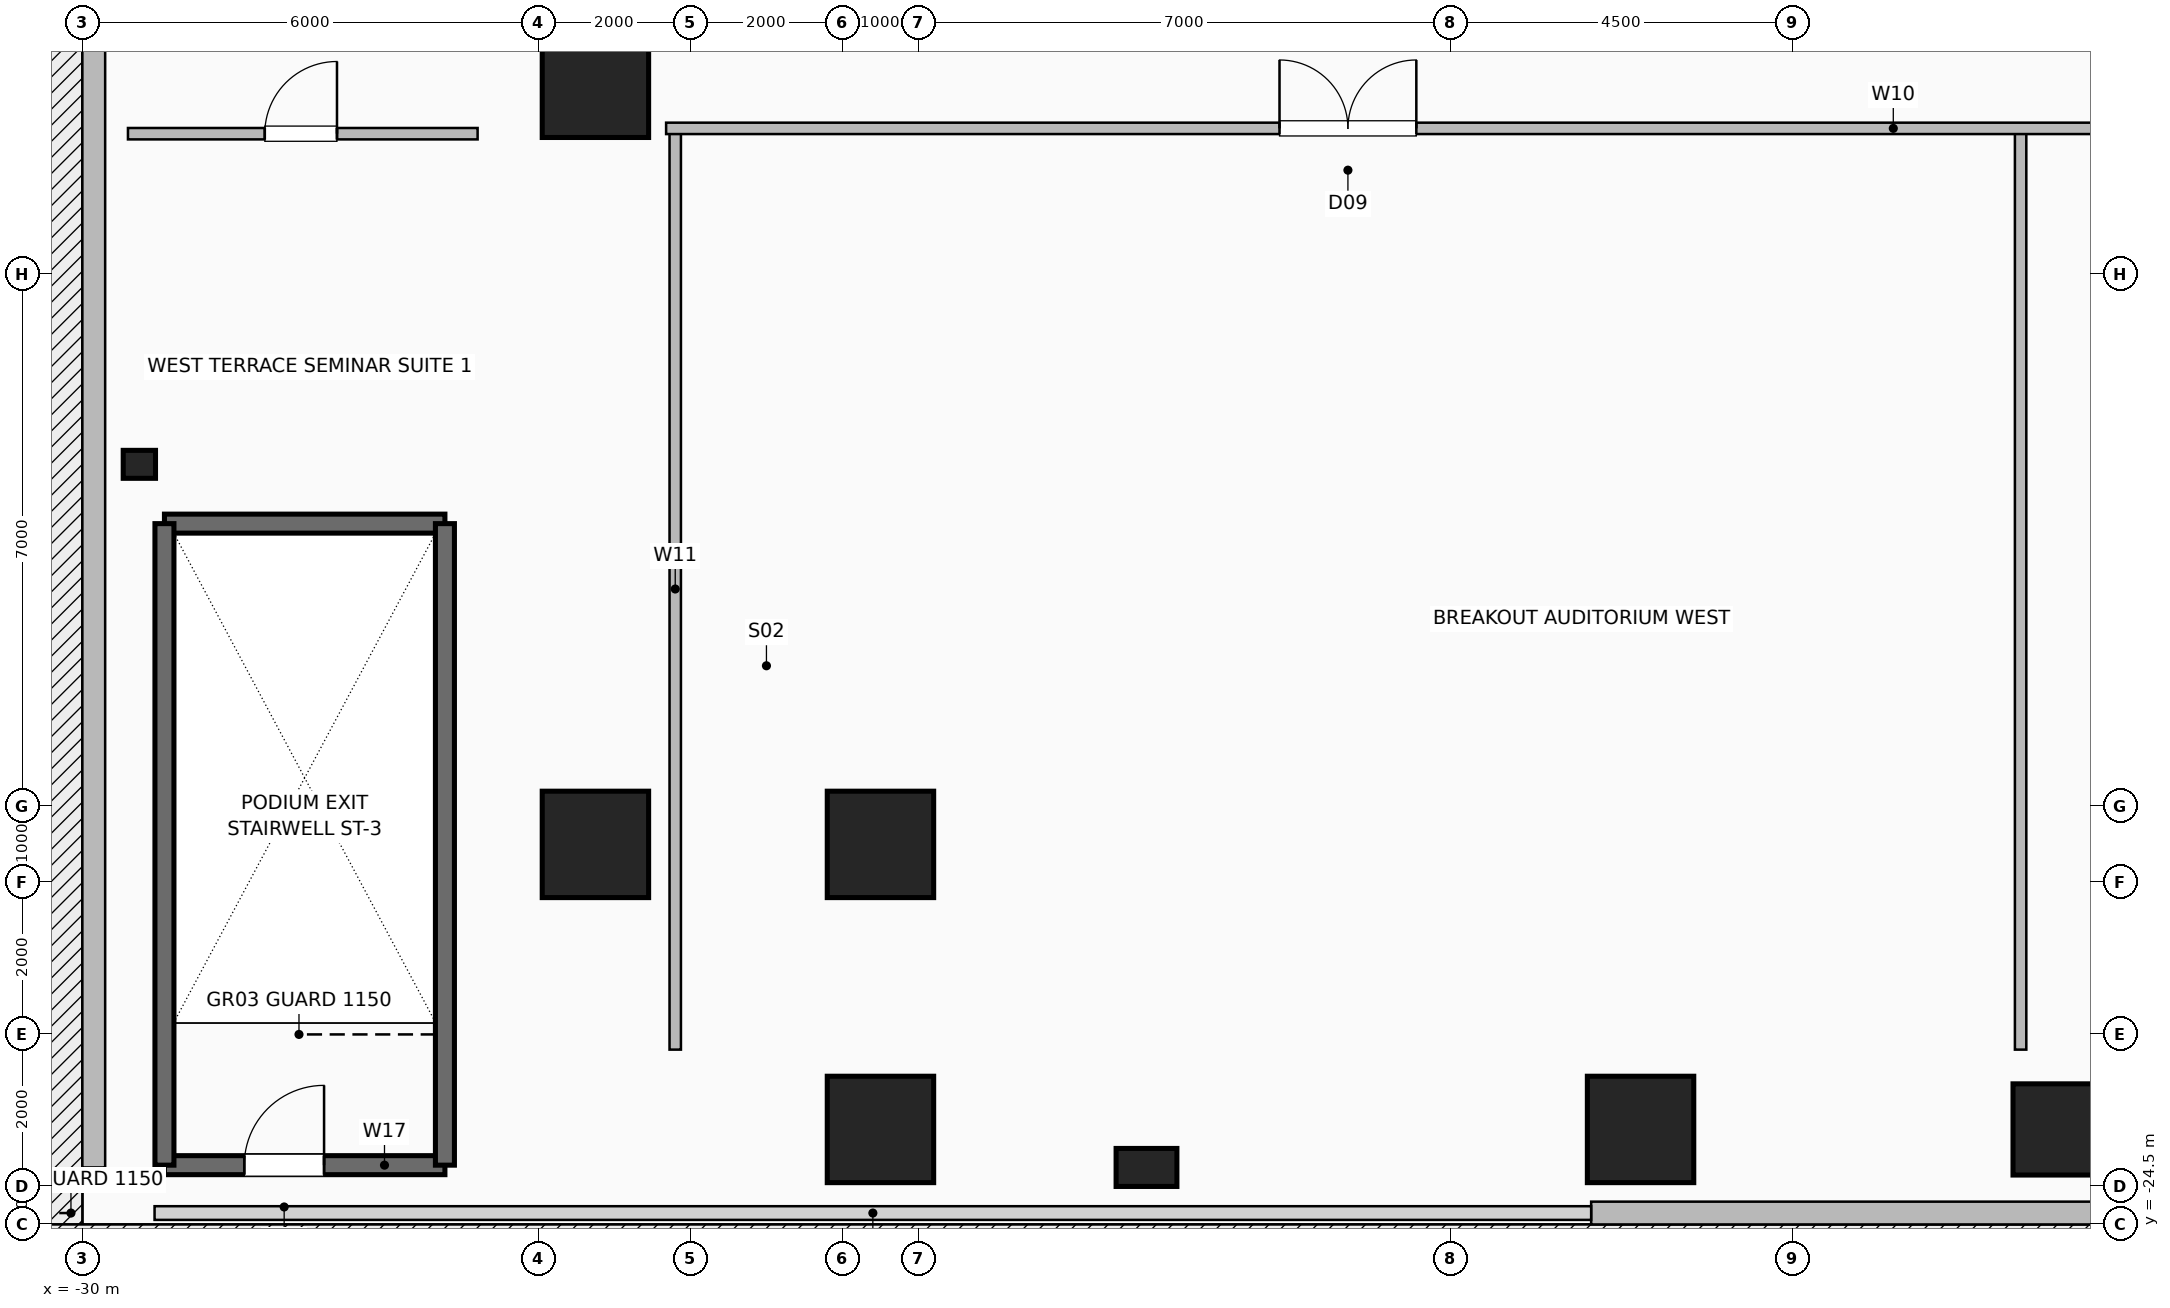
"""IFC4 building model, lengths in metres.
Left out: names, types, materials, properties, quantities, classifications, styles, units other than length and angle.
Written with IfcOpenShell. Run it as: python <this file> out.ifc"""

import sys

from ifc_helpers import new_model, si_unit, direction, frame, frame_2d, origin, origin_2d, place, context, subcontext, project, spatial, rectangle, hollow_rectangle, i_section, extrude, element, fill, save


model = new_model("IFC4")
c1 = context("Model", 3, precision=1e-05, world=origin(), true_north=direction((0.0, 1.0)))
c2 = subcontext(c1, "Body", "Model", "MODEL_VIEW")
j1 = project(units=[si_unit("LENGTHUNIT", "METRE"), si_unit("PLANEANGLEUNIT", "RADIAN")], contexts=[c1])
p1 = place(None, origin())
s1 = spatial("IfcSite", under=j1, at=p1, CompositionType="ELEMENT")
p2 = place(p1, origin())
s2 = spatial("IfcBuilding", under=s1, at=p2, CompositionType="ELEMENT")
p3 = place(p2, frame((0.0, 0.0, 21.6)))
s3 = spatial("IfcBuildingStorey", under=s2, at=p3, CompositionType="ELEMENT", Elevation=21.6)
p4 = place(p3, frame((-19.5, -23.25, 0.0), z_axis=(0.0, 0.0, 1.0), x_axis=(1.0, 0.0, 0.0)))
e1 = element("IfcColumn", 1, at=p4, inside=s3, PredefinedType="COLUMN", context=c2, shape_type="SweptSolid", body=[
    extrude(hollow_rectangle(XDim=1.4, YDim=1.4, WallThickness=0.06, at=origin_2d()), origin(), (0.0, 0.0, 1.0), 5.4),
])
p5 = place(p3, frame((-9.5, -23.25, 0.0), z_axis=(0.0, 0.0, 1.0), x_axis=(1.0, 0.0, 0.0)))
e2 = element("IfcColumn", 2, at=p5, inside=s3, PredefinedType="COLUMN", context=c2, shape_type="SweptSolid", body=[
    extrude(hollow_rectangle(XDim=1.4, YDim=1.4, WallThickness=0.06, at=origin_2d()), origin(), (0.0, 0.0, 1.0), 5.0),
])
p6 = place(p3, frame((-23.25, -19.5, 0.0), z_axis=(0.0, 0.0, 1.0), x_axis=(1.0, 0.0, 0.0)))
e3 = element("IfcColumn", 3, at=p6, inside=s3, PredefinedType="COLUMN", context=c2, shape_type="SweptSolid", body=[
    extrude(hollow_rectangle(XDim=1.4, YDim=1.4, WallThickness=0.06, at=origin_2d()), origin(), (0.0, 0.0, 1.0), 5.4),
])
p7 = place(p3, frame((-23.25, -9.5, 0.0), z_axis=(0.0, 0.0, 1.0), x_axis=(1.0, 0.0, 0.0)))
e4 = element("IfcColumn", 4, at=p7, inside=s3, PredefinedType="COLUMN", context=c2, shape_type="SweptSolid", body=[
    extrude(hollow_rectangle(XDim=1.4, YDim=1.4, WallThickness=0.06, at=origin_2d()), origin(), (0.0, 0.0, 1.0), 5.0),
])
p8 = place(p3, frame((-19.5, -19.5, 0.0), z_axis=(0.0, 0.0, 1.0), x_axis=(1.0, 0.0, 0.0)))
e5 = element("IfcColumn", 5, at=p8, inside=s3, PredefinedType="COLUMN", context=c2, shape_type="SweptSolid", body=[
    extrude(hollow_rectangle(XDim=1.4, YDim=1.4, WallThickness=0.06, at=origin_2d()), origin(), (0.0, 0.0, 1.0), 5.4),
])
p9 = place(p3, frame((-4.0, -23.25, -0.4), z_axis=(0.0, 0.0, 1.0), x_axis=(1.0, 0.0, 0.0)))
e6 = element("IfcColumn", 6, at=p9, inside=s3, PredefinedType="COLUMN", context=c2, shape_type="SweptSolid", body=[
    extrude(hollow_rectangle(XDim=1.2, YDim=1.2, WallThickness=0.055, at=origin_2d()), origin(), (0.0, 0.0, 1.0), 5.8),
])
p10 = place(p3, frame((-29.25, -14.5, 0.0), z_axis=(0.0, 0.0, 1.0), x_axis=(1.0, 0.0, 0.0)))
e7 = element("IfcColumn", 7, at=p10, inside=s3, PredefinedType="COLUMN", context=c2, shape_type="SweptSolid", body=[
    extrude(i_section(OverallWidth=0.368, OverallDepth=0.425, WebThickness=0.03, FlangeThickness=0.048, FilletRadius=0.02, at=origin_2d()), origin(), (0.0, 0.0, 1.0), 5.0),
])
p11 = place(p3, frame((-16.0, -23.75, 0.0), z_axis=(0.0, 0.0, 1.0), x_axis=(1.0, 0.0, 0.0)))
e8 = element("IfcColumn", 8, at=p11, inside=s3, PredefinedType="PILASTER", context=c2, shape_type="SweptSolid", body=[
    extrude(rectangle(XDim=0.5, YDim=0.8, at=origin_2d()), origin(), (0.0, 0.0, 1.0), 5.0),
])
p12 = place(p3, frame((-29.85, -23.75, 0.0), z_axis=(0.0, 0.0, 1.0), x_axis=(0.0, 1.0, 0.0)))
e9 = element("IfcWall", 9, at=p12, inside=s3, PredefinedType="SOLIDWALL", context=c2, shape_type="SweptSolid", body=[
    extrude(rectangle(XDim=33.6, YDim=0.3, at=frame_2d((16.8, 0.0))), origin(), (0.0, 0.0, 1.0), 5.0),
])
p13 = place(p12, frame((30.4, 0.0, 0.0)))
e10 = element("IfcOpeningElement", 10, at=p13, cuts=e9, PredefinedType="OPENING", context=c2, shape_type="SweptSolid", body=[
    extrude(rectangle(XDim=1.2, YDim=2.25, at=frame_2d((0.6, 1.125))), frame((0.0, 0.16, 0.0), z_axis=(0.0, -1.0, 0.0), x_axis=(1.0, 0.0, 0.0)), (0.0, 0.0, 1.0), 0.32),
])
p14 = place(p3, frame((-10.15, -24.35, 0.0), z_axis=(0.0, 0.0, 1.0), x_axis=(1.0, 0.0, 0.0)))
e11 = element("IfcWall", 11, at=p14, inside=s3, PredefinedType="SOLIDWALL", context=c2, shape_type="SweptSolid", body=[
    extrude(rectangle(XDim=25.5, YDim=0.3, at=frame_2d((12.75, 0.0))), origin(), (0.0, 0.0, 1.0), 5.0),
])
p15 = place(p14, frame((22.3, 0.0, 0.0)))
e12 = element("IfcOpeningElement", 12, at=p15, cuts=e11, PredefinedType="OPENING", context=c2, shape_type="SweptSolid", body=[
    extrude(rectangle(XDim=1.2, YDim=2.25, at=frame_2d((0.6, 1.125))), frame((0.0, 0.16, 0.0), z_axis=(0.0, -1.0, 0.0), x_axis=(1.0, 0.0, 0.0)), (0.0, 0.0, 1.0), 0.32),
])
p16 = place(p3, frame((-28.92, -23.72, 0.0), z_axis=(0.0, 0.0, 1.0), x_axis=(1.0, 0.0, 0.0)))
e13 = element("IfcWall", 13, at=p16, inside=s3, PredefinedType="SHEAR", context=c2, shape_type="SweptSolid", body=[
    extrude(rectangle(XDim=3.69, YDim=0.25, at=frame_2d((1.845, 0.0))), origin(), (0.0, 0.0, 1.0), 5.0),
])
p17 = place(p16, frame((1.05, 0.0, 0.0)))
e14 = element("IfcOpeningElement", 14, at=p17, cuts=e13, PredefinedType="OPENING", context=c2, shape_type="SweptSolid", body=[
    extrude(rectangle(XDim=1.05, YDim=2.08, at=frame_2d((0.525, 1.04))), frame((0.0, 0.135, 0.0), z_axis=(0.0, -1.0, 0.0), x_axis=(1.0, 0.0, 0.0)), (0.0, 0.0, 1.0), 0.27),
])
p18 = place(p3, frame((-28.92, -15.28, 0.0), z_axis=(0.0, 0.0, 1.0), x_axis=(1.0, 0.0, 0.0)))
e15 = element("IfcWall", 15, at=p18, inside=s3, PredefinedType="SHEAR", context=c2, shape_type="SweptSolid", body=[
    extrude(rectangle(XDim=3.69, YDim=0.25, at=frame_2d((1.845, 0.0))), origin(), (0.0, 0.0, 1.0), 5.0),
])
for number, where, z_axis, x_axis in (
    (16, (-28.92, -23.72, 0.0), (0.0, 0.0, 1.0), (0.0, 1.0, 0.0)),
    (17, (-25.23, -23.72, 0.0), (0.0, 0.0, 1.0), (0.0, 1.0, 0.0)),
):
    element("IfcWall", number, at=place(p3, frame(where, z_axis=z_axis, x_axis=x_axis)), inside=s3, PredefinedType="SHEAR", context=c2, shape_type="SweptSolid", body=[
        extrude(rectangle(XDim=8.44, YDim=0.25, at=frame_2d((4.22, 0.0))), origin(), (0.0, 0.0, 1.0), 5.0),
    ])
for number, where, z_axis, x_axis in (
    (18, (-22.2, -22.2, 0.0), (0.0, 0.0, 1.0), (0.0, 1.0, 0.0)),
    (19, (-4.5, -22.2, 0.0), (0.0, 0.0, 1.0), (0.0, 1.0, 0.0)),
):
    element("IfcWall", number, at=place(p3, frame(where, z_axis=z_axis, x_axis=x_axis)), inside=s3, PredefinedType="PARTITIONING", context=c2, shape_type="SweptSolid", body=[
        extrude(rectangle(XDim=12.12, YDim=0.15, at=frame_2d((6.06, 0.0))), origin(), (0.0, 0.0, 1.0), 5.0),
    ])
p19 = place(p3, frame((-22.32, -10.08, 0.0), z_axis=(0.0, 0.0, 1.0), x_axis=(1.0, 0.0, 0.0)))
e20 = element("IfcWall", 20, at=p19, inside=s3, PredefinedType="PARTITIONING", context=c2, shape_type="SweptSolid", body=[
    extrude(rectangle(XDim=44.64, YDim=0.15, at=frame_2d((22.32, 0.0))), origin(), (0.0, 0.0, 1.0), 5.0),
])
p20 = place(p19, frame((8.07, 0.0, 0.0)))
e21 = element("IfcOpeningElement", 21, at=p20, cuts=e20, PredefinedType="OPENING", context=c2, shape_type="SweptSolid", body=[
    extrude(rectangle(XDim=1.8, YDim=2.08, at=frame_2d((0.9, 1.04))), frame((0.0, 0.085, 0.0), z_axis=(0.0, -1.0, 0.0), x_axis=(1.0, 0.0, 0.0)), (0.0, 0.0, 1.0), 0.17),
])
p21 = place(p19, frame((22.42, 0.0, 0.0)))
e22 = element("IfcOpeningElement", 22, at=p21, cuts=e20, PredefinedType="OPENING", context=c2, shape_type="SweptSolid", body=[
    extrude(rectangle(XDim=1.8, YDim=2.08, at=frame_2d((0.9, 1.04))), frame((0.0, 0.085, 0.0), z_axis=(0.0, -1.0, 0.0), x_axis=(1.0, 0.0, 0.0)), (0.0, 0.0, 1.0), 0.17),
])
p22 = place(p19, frame((35.77, 0.0, 0.0)))
e23 = element("IfcOpeningElement", 23, at=p22, cuts=e20, PredefinedType="OPENING", context=c2, shape_type="SweptSolid", body=[
    extrude(rectangle(XDim=1.8, YDim=2.08, at=frame_2d((0.9, 1.04))), frame((0.0, 0.085, 0.0), z_axis=(0.0, -1.0, 0.0), x_axis=(1.0, 0.0, 0.0)), (0.0, 0.0, 1.0), 0.17),
])
p23 = place(p3, frame((-29.4, -10.15, 0.0), z_axis=(0.0, 0.0, 1.0), x_axis=(1.0, 0.0, 0.0)))
e24 = element("IfcWall", 24, at=p23, inside=s3, PredefinedType="PARTITIONING", context=c2, shape_type="SweptSolid", body=[
    extrude(rectangle(XDim=4.6, YDim=0.15, at=frame_2d((2.3, 0.0))), origin(), (0.0, 0.0, 1.0), 5.0),
])
p24 = place(p23, frame((1.8, 0.0, 0.0)))
e25 = element("IfcOpeningElement", 25, at=p24, cuts=e24, PredefinedType="OPENING", context=c2, shape_type="SweptSolid", body=[
    extrude(rectangle(XDim=0.95, YDim=2.06, at=frame_2d((0.475, 1.03))), frame((0.0, 0.085, 0.0), z_axis=(0.0, -1.0, 0.0), x_axis=(1.0, 0.0, 0.0)), (0.0, 0.0, 1.0), 0.17),
])
p25 = place(p17, origin())
e26 = element("IfcDoor", 26, at=p25, inside=s3, OperationType="SINGLE_SWING_RIGHT", PredefinedType="DOOR", context=c2, shape_type="SweptSolid", body=[
    extrude(rectangle(XDim=1.05, YDim=2.08, at=frame_2d((0.525, 1.04))), frame((0.0, 0.025, 0.0), z_axis=(0.0, -1.0, 0.0), x_axis=(1.0, 0.0, 0.0)), (0.0, 0.0, 1.0), 0.05),
])
fill(e14, e26)
p26 = place(p20, origin())
e27 = element("IfcDoor", 27, at=p26, inside=s3, OperationType="DOUBLE_DOOR_SINGLE_SWING", PredefinedType="DOOR", context=c2, shape_type="SweptSolid", body=[
    extrude(rectangle(XDim=1.8, YDim=2.08, at=frame_2d((0.9, 1.04))), frame((0.0, 0.025, 0.0), z_axis=(0.0, -1.0, 0.0), x_axis=(1.0, 0.0, 0.0)), (0.0, 0.0, 1.0), 0.05),
])
fill(e21, e27)
p27 = place(p24, origin())
e28 = element("IfcDoor", 28, at=p27, inside=s3, OperationType="SINGLE_SWING_RIGHT", PredefinedType="DOOR", context=c2, shape_type="SweptSolid", body=[
    extrude(rectangle(XDim=0.95, YDim=2.06, at=frame_2d((0.475, 1.03))), frame((0.0, 0.025, 0.0), z_axis=(0.0, -1.0, 0.0), x_axis=(1.0, 0.0, 0.0)), (0.0, 0.0, 1.0), 0.05),
])
fill(e25, e28)
save(model, sys.argv[1])
